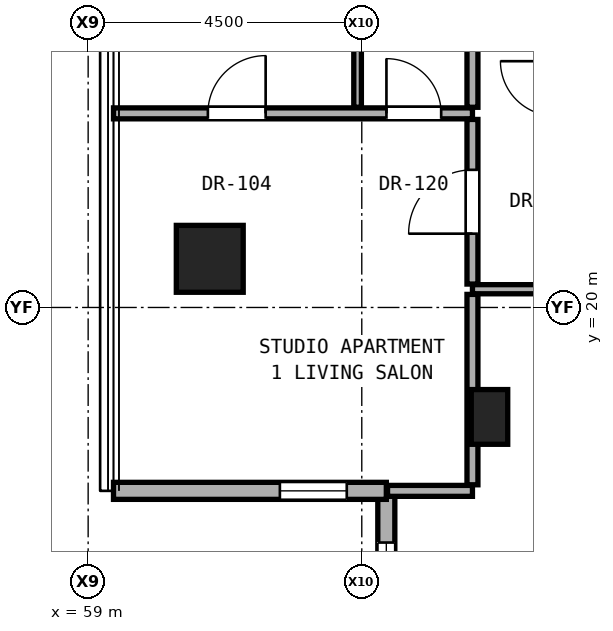
"""IFC4 building model, lengths in metres.
Left out: names, types, materials, properties, quantities, classifications, styles, units other than length and angle.
Written with IfcOpenShell. Run it as: python <this file> out.ifc"""

import sys

from ifc_helpers import new_model, si_unit, direction, frame, frame_2d, origin, origin_2d, place, context, subcontext, project, spatial, rectangle, hollow_rectangle, extrude, element, fill, save


model = new_model("IFC4")
c1 = context("Model", 3, precision=1e-05, world=origin(), true_north=direction((0.0, 1.0)))
c2 = subcontext(c1, "Body", "Model", "MODEL_VIEW")
j1 = project(units=[si_unit("LENGTHUNIT", "METRE"), si_unit("PLANEANGLEUNIT", "RADIAN")], contexts=[c1])
p1 = place(None, origin())
s1 = spatial("IfcSite", under=j1, at=p1, CompositionType="ELEMENT")
p2 = place(p1, origin())
s2 = spatial("IfcBuilding", under=s1, at=p2, CompositionType="ELEMENT")
p3 = place(p2, frame((0.0, 0.0, 121.4)))
s3 = spatial("IfcBuildingStorey", under=s2, at=p3, CompositionType="ELEMENT", Elevation=121.4)
p4 = place(p3, frame((61.0, 20.8, 0.0), z_axis=(0.0, 0.0, 1.0), x_axis=(1.0, 0.0, 0.0)))
e1 = element("IfcColumn", 1, at=p4, inside=s3, PredefinedType="COLUMN", context=c2, shape_type="SweptSolid", body=[
    extrude(hollow_rectangle(XDim=1.1, YDim=1.1, WallThickness=0.06, at=origin_2d()), origin(), (0.0, 0.0, 1.0), 3.3),
])
p5 = place(p3, frame((65.6, 18.2, 0.0), z_axis=(0.0, 0.0, 1.0), x_axis=(1.0, 0.0, 0.0)))
e2 = element("IfcColumn", 2, at=p5, inside=s3, PredefinedType="PILASTER", context=c2, shape_type="SweptSolid", body=[
    extrude(rectangle(XDim=0.6, YDim=0.9, at=origin_2d()), origin(), (0.0, 0.0, 1.0), 3.3),
])
p6 = place(p3, frame((63.904, 16.984, 0.0), z_axis=(0.0, 0.0, 1.0), x_axis=(0.0, -1.0, 0.0)))
e3 = element("IfcWall", 3, at=p6, inside=s3, PredefinedType="SOLIDWALL", context=c2, shape_type="SweptSolid", body=[
    extrude(rectangle(XDim=4.486, YDim=0.28, at=frame_2d((2.243, 0.0))), origin(), (0.0, 0.0, 1.0), 3.06),
])
p7 = place(p6, frame((0.85, 0.0, 0.81)))
e4 = element("IfcOpeningElement", 4, at=p7, cuts=e3, PredefinedType="OPENING", context=c2, shape_type="SweptSolid", body=[
    extrude(rectangle(XDim=1.5, YDim=2.1, at=frame_2d((0.75, 1.05))), frame((0.0, 0.15, 0.0), z_axis=(0.0, -1.0, 0.0), x_axis=(1.0, 0.0, 0.0)), (0.0, 0.0, 1.0), 0.3),
])
p8 = place(p3, frame((59.417, 16.984, 0.0), z_axis=(0.0, 0.0, 1.0), x_axis=(1.0, 0.0, 0.0)))
e5 = element("IfcWall", 5, at=p8, inside=s3, PredefinedType="SOLIDWALL", context=c2, shape_type="SweptSolid", body=[
    extrude(rectangle(XDim=4.487, YDim=0.28, at=frame_2d((2.243, 0.0))), origin(), (0.0, 0.0, 1.0), 3.06),
])
p9 = place(p8, frame((2.736, 0.0, 0.85)))
e6 = element("IfcOpeningElement", 6, at=p9, cuts=e5, PredefinedType="OPENING", context=c2, shape_type="SweptSolid", body=[
    extrude(rectangle(XDim=1.1, YDim=2.0, at=frame_2d((0.55, 1.0))), frame((0.0, 0.15, 0.0), z_axis=(0.0, -1.0, 0.0), x_axis=(1.0, 0.0, 0.0)), (0.0, 0.0, 1.0), 0.3),
])
p10 = place(p3, frame((63.924, 16.984, 0.0), z_axis=(0.0, 0.0, 1.0), x_axis=(1.0, 0.0, 0.0)))
e7 = element("IfcWall", 7, at=p10, inside=s3, PredefinedType="PARTITIONING", context=c2, shape_type="SweptSolid", body=[
    extrude(rectangle(XDim=1.396, YDim=0.18, at=frame_2d((0.698, 0.0))), origin(), (0.0, 0.0, 1.0), 3.08),
])
p11 = place(p3, frame((65.32, 20.3, 0.0), z_axis=(0.0, 0.0, 1.0), x_axis=(1.0, 0.0, 0.0)))
e8 = element("IfcWall", 8, at=p11, inside=s3, PredefinedType="PARTITIONING", context=c2, shape_type="SweptSolid", body=[
    extrude(rectangle(XDim=1.36, YDim=0.15, at=frame_2d((0.68, 0.0))), origin(), (0.0, 0.0, 1.0), 3.08),
])
p12 = place(p3, frame((59.417, 23.192, 0.0), z_axis=(0.0, 0.0, 1.0), x_axis=(1.0, 0.0, 0.0)))
e9 = element("IfcWall", 9, at=p12, inside=s3, PredefinedType="PARTITIONING", context=c2, shape_type="SweptSolid", body=[
    extrude(rectangle(XDim=5.903, YDim=0.18, at=frame_2d((2.952, 0.0))), origin(), (0.0, 0.0, 1.0), 2.299),
])
p13 = place(p12, frame((1.552, 0.0, 0.0)))
e10 = element("IfcOpeningElement", 10, at=p13, cuts=e9, PredefinedType="OPENING", context=c2, shape_type="SweptSolid", body=[
    extrude(rectangle(XDim=0.95, YDim=2.15, at=frame_2d((0.475, 1.075))), frame((0.0, 0.1, 0.0), z_axis=(0.0, -1.0, 0.0), x_axis=(1.0, 0.0, 0.0)), (0.0, 0.0, 1.0), 0.2),
])
p14 = place(p12, frame((4.489, 0.0, 0.0)))
e11 = element("IfcOpeningElement", 11, at=p14, cuts=e9, PredefinedType="OPENING", context=c2, shape_type="SweptSolid", body=[
    extrude(rectangle(XDim=0.9, YDim=2.1, at=frame_2d((0.45, 1.05))), frame((0.0, 0.1, 0.0), z_axis=(0.0, -1.0, 0.0), x_axis=(1.0, 0.0, 0.0)), (0.0, 0.0, 1.0), 0.2),
])
p15 = place(p3, frame((63.431, 23.292, 0.0), z_axis=(0.0, 0.0, 1.0), x_axis=(0.0, 1.0, 0.0)))
e12 = element("IfcWall", 12, at=p15, inside=s3, PredefinedType="PARTITIONING", context=c2, shape_type="SweptSolid", body=[
    extrude(rectangle(XDim=2.127, YDim=0.125, at=frame_2d((1.064, 0.0))), origin(), (0.0, 0.0, 1.0), 3.08),
])
p16 = place(p3, frame((65.32, 17.084, 0.0), z_axis=(0.0, 0.0, 1.0), x_axis=(0.0, 1.0, 0.0)))
e13 = element("IfcWall", 13, at=p16, inside=s3, PredefinedType="PARTITIONING", context=c2, shape_type="SweptSolid", body=[
    extrude(rectangle(XDim=3.131, YDim=0.18, at=frame_2d((1.565, 0.0))), origin(), (0.0, 0.0, 1.0), 2.523),
])
p17 = place(p3, frame((65.32, 20.385, 0.0), z_axis=(0.0, 0.0, 1.0), x_axis=(0.0, 1.0, 0.0)))
e14 = element("IfcWall", 14, at=p17, inside=s3, PredefinedType="PARTITIONING", context=c2, shape_type="SweptSolid", body=[
    extrude(rectangle(XDim=2.707, YDim=0.18, at=frame_2d((1.354, 0.0))), origin(), (0.0, 0.0, 1.0), 2.472),
])
p18 = place(p17, frame((0.829, 0.0, 0.0)))
e15 = element("IfcOpeningElement", 15, at=p18, cuts=e14, PredefinedType="OPENING", context=c2, shape_type="SweptSolid", body=[
    extrude(rectangle(XDim=1.05, YDim=2.2, at=frame_2d((0.525, 1.1))), frame((0.0, 0.1, 0.0), z_axis=(0.0, -1.0, 0.0), x_axis=(1.0, 0.0, 0.0)), (0.0, 0.0, 1.0), 0.2),
])
p19 = place(p3, frame((65.32, 23.292, 0.0), z_axis=(0.0, 0.0, 1.0), x_axis=(0.0, 1.0, 0.0)))
e16 = element("IfcWall", 16, at=p19, inside=s3, PredefinedType="PARTITIONING", context=c2, shape_type="SweptSolid", body=[
    extrude(rectangle(XDim=2.127, YDim=0.18, at=frame_2d((1.064, 0.0))), origin(), (0.0, 0.0, 1.0), 3.08),
])
p20 = place(p7, origin())
e17 = element("IfcWindow", 17, at=p20, inside=s3, PartitioningType="SINGLE_PANEL", PredefinedType="WINDOW", context=c2, shape_type="SweptSolid", body=[
    extrude(rectangle(XDim=1.5, YDim=2.1, at=frame_2d((0.75, 1.05))), frame((0.0, 0.03, 0.0), z_axis=(0.0, -1.0, 0.0), x_axis=(1.0, 0.0, 0.0)), (0.0, 0.0, 1.0), 0.06),
])
fill(e4, e17)
p21 = place(p9, origin())
e18 = element("IfcWindow", 18, at=p21, inside=s3, PartitioningType="SINGLE_PANEL", PredefinedType="WINDOW", context=c2, shape_type="SweptSolid", body=[
    extrude(rectangle(XDim=1.1, YDim=2.0, at=frame_2d((0.55, 1.0))), frame((0.0, 0.03, 0.0), z_axis=(0.0, -1.0, 0.0), x_axis=(1.0, 0.0, 0.0)), (0.0, 0.0, 1.0), 0.06),
])
fill(e6, e18)
p22 = place(p18, origin())
e19 = element("IfcDoor", 19, at=p22, inside=s3, OperationType="SINGLE_SWING_LEFT", PredefinedType="DOOR", context=c2, shape_type="SweptSolid", body=[
    extrude(rectangle(XDim=1.05, YDim=2.2, at=frame_2d((0.525, 1.1))), frame((0.0, 0.025, 0.0), z_axis=(0.0, -1.0, 0.0), x_axis=(1.0, 0.0, 0.0)), (0.0, 0.0, 1.0), 0.05),
])
fill(e15, e19)
p23 = place(p13, origin())
e20 = element("IfcDoor", 20, at=p23, inside=s3, OperationType="SINGLE_SWING_RIGHT", PredefinedType="DOOR", context=c2, shape_type="SweptSolid", body=[
    extrude(rectangle(XDim=0.95, YDim=2.15, at=frame_2d((0.475, 1.075))), frame((0.0, 0.025, 0.0), z_axis=(0.0, -1.0, 0.0), x_axis=(1.0, 0.0, 0.0)), (0.0, 0.0, 1.0), 0.05),
])
fill(e10, e20)
p24 = place(p14, origin())
e21 = element("IfcDoor", 21, at=p24, inside=s3, OperationType="SINGLE_SWING_LEFT", PredefinedType="DOOR", context=c2, shape_type="SweptSolid", body=[
    extrude(rectangle(XDim=0.9, YDim=2.1, at=frame_2d((0.45, 1.05))), frame((0.0, 0.025, 0.0), z_axis=(0.0, -1.0, 0.0), x_axis=(1.0, 0.0, 0.0)), (0.0, 0.0, 1.0), 0.05),
])
fill(e11, e21)
save(model, sys.argv[1])
